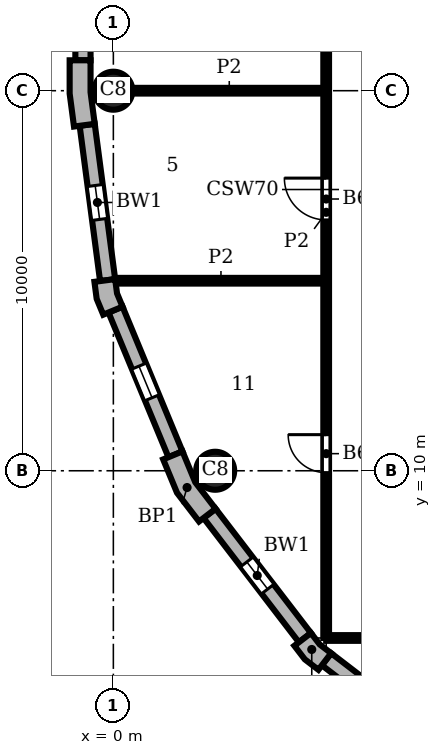
"""IFC4 building model, lengths in metres.
Left out: names, types, materials, properties, quantities, classifications, styles, units other than length and angle.
Written with IfcOpenShell. Run it as: python <this file> out.ifc"""

import sys

from ifc_helpers import new_model, si_unit, direction, frame, frame_2d, origin, origin_2d, place, context, subcontext, project, spatial, polyline, rectangle, circle, outline, extrude, element, fill, save


model = new_model("IFC4")
c1 = context("Model", 3, precision=1e-05, world=origin(), true_north=direction((0.0, 1.0)))
c2 = subcontext(c1, "Body", "Model", "MODEL_VIEW")
j1 = project(units=[si_unit("LENGTHUNIT", "METRE"), si_unit("PLANEANGLEUNIT", "RADIAN")], contexts=[c1])
p1 = place(None, origin())
s1 = spatial("IfcSite", under=j1, at=p1, CompositionType="ELEMENT")
p2 = place(p1, origin())
s2 = spatial("IfcBuilding", under=s1, at=p2, CompositionType="ELEMENT")
p3 = place(p2, frame((0.0, 0.0, 190.2)))
s3 = spatial("IfcBuildingStorey", under=s2, at=p3, CompositionType="ELEMENT", Elevation=190.2)
for number, where, z_axis, x_axis in (
    (1, (0.0, 20.0, 0.0), (0.0, 0.0, 1.0), (1.0, 0.0, 0.0)),
    (2, (2.679, 10.0, 0.0), (0.0, 0.0, 1.0), (1.0, 0.0, 0.0)),
):
    element("IfcColumn", number, at=place(p3, frame(where, z_axis=z_axis, x_axis=x_axis)), inside=s3, PredefinedType="COLUMN", context=c2, shape_type="SweptSolid", body=[
        extrude(circle(Radius=0.5, at=origin_2d()), origin(), (0.0, 0.0, 1.0), 3.9),
    ])
p4 = place(p3, origin())
e3 = element("IfcWall", 3, at=p4, inside=s3, PredefinedType="SOLIDWALL", context=c2, shape_type="SweptSolid", body=[
    extrude(outline(polyline([(-1.0, 20.8), (-1.15, 20.8), (-1.15, 19.925), (-1.036, 19.057), (-0.887, 19.076), (-0.49, 19.128), (-0.6, 19.961), (-0.6, 20.8), (-1.0, 20.8)])), origin(), (0.0, 0.0, 1.0), 3.9),
])
e4 = element("IfcWall", 4, at=p4, inside=s3, PredefinedType="SOLIDWALL", context=c2, shape_type="SweptSolid", body=[
    extrude(outline(polyline([(-0.349, 14.99), (-0.498, 14.971), (-0.439, 14.523), (-0.266, 14.106), (-0.128, 14.164), (0.242, 14.317), (0.097, 14.667), (0.047, 15.043), (-0.349, 14.99)])), origin(), (0.0, 0.0, 1.0), 3.9),
])
e5 = element("IfcWall", 5, at=p4, inside=s3, PredefinedType="SOLIDWALL", context=c2, shape_type="SweptSolid", body=[
    extrude(outline(polyline([(1.449, 10.356), (1.311, 10.299), (1.675, 9.42), (2.254, 8.665), (2.373, 8.757), (2.69, 9.0), (2.155, 9.698), (1.819, 10.51), (1.449, 10.356)])), origin(), (0.0, 0.0, 1.0), 3.9),
])
e6 = element("IfcWall", 6, at=p4, inside=s3, PredefinedType="SOLIDWALL", context=c2, shape_type="SweptSolid", body=[
    extrude(outline(polyline([(4.882, 5.487), (4.763, 5.396), (5.038, 5.038), (5.396, 4.763), (5.487, 4.882), (5.731, 5.199), (5.43, 5.43), (5.199, 5.731), (4.882, 5.487)])), origin(), (0.0, 0.0, 1.0), 3.9),
])
p5 = place(p3, frame((-0.8, 39.2, 0.0), z_axis=(0.0, 0.0, 1.0), x_axis=(0.0, -1.0, 0.0)))
e7 = element("IfcWall", 7, at=p5, inside=s3, PredefinedType="SOLIDWALL", context=c2, shape_type="SweptSolid", body=[
    extrude(rectangle(XDim=18.4, YDim=0.4, at=frame_2d((9.2, 0.0))), origin(), (0.0, 0.0, 1.0), 3.9),
])
p6 = place(p5, frame((3.75, 0.0, 0.9)))
e8 = element("IfcOpeningElement", 8, at=p6, cuts=e7, PredefinedType="OPENING", context=c2, shape_type="SweptSolid", body=[
    extrude(rectangle(XDim=0.9, YDim=2.35, at=frame_2d((0.45, 1.175))), frame((0.0, 0.21, 0.0), z_axis=(0.0, -1.0, 0.0), x_axis=(1.0, 0.0, 0.0)), (0.0, 0.0, 1.0), 0.42),
])
p7 = place(p5, frame((13.75, 0.0, 0.9)))
e9 = element("IfcOpeningElement", 9, at=p7, cuts=e7, PredefinedType="OPENING", context=c2, shape_type="SweptSolid", body=[
    extrude(rectangle(XDim=0.9, YDim=2.35, at=frame_2d((0.45, 1.175))), frame((0.0, 0.21, 0.0), z_axis=(0.0, -1.0, 0.0), x_axis=(1.0, 0.0, 0.0)), (0.0, 0.0, 1.0), 0.42),
])
p8 = place(p3, frame((-0.689, 19.102, 0.0), z_axis=(0.0, 0.0, 1.0), x_axis=(0.130514280502, -0.991446429508, 0.0)))
e10 = element("IfcWall", 10, at=p8, inside=s3, PredefinedType="SOLIDWALL", context=c2, shape_type="SweptSolid", body=[
    extrude(rectangle(XDim=4.121, YDim=0.4, at=frame_2d((2.061, 0.0))), origin(), (0.0, 0.0, 1.0), 3.9),
])
p9 = place(p8, frame((1.611, 0.0, 0.9)))
e11 = element("IfcOpeningElement", 11, at=p9, cuts=e10, PredefinedType="OPENING", context=c2, shape_type="SweptSolid", body=[
    extrude(rectangle(XDim=0.9, YDim=2.35, at=frame_2d((0.45, 1.175))), frame((0.0, 0.21, 0.0), z_axis=(0.0, -1.0, 0.0), x_axis=(1.0, 0.0, 0.0)), (0.0, 0.0, 1.0), 0.42),
])
p10 = place(p3, frame((0.057, 14.24, 0.0), z_axis=(0.0, 0.0, 1.0), x_axis=(0.382721546029, -0.923863744394, 0.0)))
e12 = element("IfcWall", 12, at=p10, inside=s3, PredefinedType="SOLIDWALL", context=c2, shape_type="SweptSolid", body=[
    extrude(rectangle(XDim=4.121, YDim=0.4, at=frame_2d((2.061, 0.0))), origin(), (0.0, 0.0, 1.0), 3.9),
])
p11 = place(p10, frame((1.611, 0.0, 0.9)))
e13 = element("IfcOpeningElement", 13, at=p11, cuts=e12, PredefinedType="OPENING", context=c2, shape_type="SweptSolid", body=[
    extrude(rectangle(XDim=0.9, YDim=2.35, at=frame_2d((0.45, 1.175))), frame((0.0, 0.21, 0.0), z_axis=(0.0, -1.0, 0.0), x_axis=(1.0, 0.0, 0.0)), (0.0, 0.0, 1.0), 0.42),
])
p12 = place(p3, frame((2.532, 8.878, 0.0), z_axis=(0.0, 0.0, 1.0), x_axis=(0.608759824817, -0.793354571229, 0.0)))
e14 = element("IfcWall", 14, at=p12, inside=s3, PredefinedType="SOLIDWALL", context=c2, shape_type="SweptSolid", body=[
    extrude(rectangle(XDim=4.121, YDim=0.4, at=frame_2d((2.061, 0.0))), origin(), (0.0, 0.0, 1.0), 3.9),
])
p13 = place(p12, frame((1.611, 0.0, 0.9)))
e15 = element("IfcOpeningElement", 15, at=p13, cuts=e14, PredefinedType="OPENING", context=c2, shape_type="SweptSolid", body=[
    extrude(rectangle(XDim=0.9, YDim=2.35, at=frame_2d((0.45, 1.175))), frame((0.0, 0.21, 0.0), z_axis=(0.0, -1.0, 0.0), x_axis=(1.0, 0.0, 0.0)), (0.0, 0.0, 1.0), 0.42),
])
p14 = place(p3, frame((5.609, 5.041, 0.0), z_axis=(0.0, 0.0, 1.0), x_axis=(0.793354571229, -0.608759824817, 0.0)))
e16 = element("IfcWall", 16, at=p14, inside=s3, PredefinedType="SOLIDWALL", context=c2, shape_type="SweptSolid", body=[
    extrude(rectangle(XDim=4.121, YDim=0.4, at=frame_2d((2.061, 0.0))), origin(), (0.0, 0.0, 1.0), 3.9),
])
p15 = place(p14, frame((1.611, 0.0, 0.9)))
e17 = element("IfcOpeningElement", 17, at=p15, cuts=e16, PredefinedType="OPENING", context=c2, shape_type="SweptSolid", body=[
    extrude(rectangle(XDim=0.9, YDim=2.35, at=frame_2d((0.45, 1.175))), frame((0.0, 0.21, 0.0), z_axis=(0.0, -1.0, 0.0), x_axis=(1.0, 0.0, 0.0)), (0.0, 0.0, 1.0), 0.42),
])
p16 = place(p3, frame((5.6, 5.6, 0.0), z_axis=(0.0, 0.0, 1.0), x_axis=(0.0, 1.0, 0.0)))
e18 = element("IfcWall", 18, at=p16, inside=s3, PredefinedType="PARTITIONING", context=c2, shape_type="SweptSolid", body=[
    extrude(rectangle(XDim=22.4, YDim=0.15, at=frame_2d((11.2, 0.0))), origin(), (0.0, 0.0, 1.0), 3.58),
])
p17 = place(p16, frame((4.35, 0.0, 0.0)))
e19 = element("IfcOpeningElement", 19, at=p17, cuts=e18, PredefinedType="OPENING", context=c2, shape_type="SweptSolid", body=[
    extrude(rectangle(XDim=1.0, YDim=2.1, at=frame_2d((0.5, 1.05))), frame((0.0, 0.085, 0.0), z_axis=(0.0, -1.0, 0.0), x_axis=(1.0, 0.0, 0.0)), (0.0, 0.0, 1.0), 0.17),
])
p18 = place(p16, frame((11.0, 0.0, 0.0)))
e20 = element("IfcOpeningElement", 20, at=p18, cuts=e18, PredefinedType="OPENING", context=c2, shape_type="SweptSolid", body=[
    extrude(rectangle(XDim=1.1, YDim=2.1, at=frame_2d((0.55, 1.05))), frame((0.0, 0.085, 0.0), z_axis=(0.0, -1.0, 0.0), x_axis=(1.0, 0.0, 0.0)), (0.0, 0.0, 1.0), 0.17),
])
p19 = place(p3, frame((5.6, 5.6, 0.0), z_axis=(0.0, 0.0, 1.0), x_axis=(1.0, 0.0, 0.0)))
e21 = element("IfcWall", 21, at=p19, inside=s3, PredefinedType="PARTITIONING", context=c2, shape_type="SweptSolid", body=[
    extrude(rectangle(XDim=25.4, YDim=0.15, at=frame_2d((12.7, 0.0))), origin(), (0.0, 0.0, 1.0), 3.58),
])
p20 = place(p19, frame((5.1, 0.0, 0.0)))
e22 = element("IfcOpeningElement", 22, at=p20, cuts=e21, PredefinedType="OPENING", context=c2, shape_type="SweptSolid", body=[
    extrude(rectangle(XDim=0.8, YDim=2.1, at=frame_2d((0.4, 1.05))), frame((0.0, 0.085, 0.0), z_axis=(0.0, -1.0, 0.0), x_axis=(1.0, 0.0, 0.0)), (0.0, 0.0, 1.0), 0.17),
])
p21 = place(p19, frame((11.5, 0.0, 0.0)))
e23 = element("IfcOpeningElement", 23, at=p21, cuts=e21, PredefinedType="OPENING", context=c2, shape_type="SweptSolid", body=[
    extrude(rectangle(XDim=1.1, YDim=2.1, at=frame_2d((0.55, 1.05))), frame((0.0, 0.085, 0.0), z_axis=(0.0, -1.0, 0.0), x_axis=(1.0, 0.0, 0.0)), (0.0, 0.0, 1.0), 0.17),
])
p22 = place(p19, frame((19.25, 0.0, 0.0)))
e24 = element("IfcOpeningElement", 24, at=p22, cuts=e21, PredefinedType="OPENING", context=c2, shape_type="SweptSolid", body=[
    extrude(rectangle(XDim=1.0, YDim=2.1, at=frame_2d((0.5, 1.05))), frame((0.0, 0.085, 0.0), z_axis=(0.0, -1.0, 0.0), x_axis=(1.0, 0.0, 0.0)), (0.0, 0.0, 1.0), 0.17),
])
p23 = place(p3, frame((0.063, 15.0, 0.0), z_axis=(0.0, 0.0, 1.0), x_axis=(1.0, 0.0, 0.0)))
e25 = element("IfcWall", 25, at=p23, inside=s3, PredefinedType="PARTITIONING", context=c2, shape_type="SweptSolid", body=[
    extrude(rectangle(XDim=5.537, YDim=0.15, at=frame_2d((2.769, 0.0))), origin(), (0.0, 0.0, 1.0), 3.58),
])
p24 = place(p3, frame((0.5, 20.0, 0.0), z_axis=(0.0, 0.0, 1.0), x_axis=(1.0, 0.0, 0.0)))
e26 = element("IfcWall", 26, at=p24, inside=s3, PredefinedType="PARTITIONING", context=c2, shape_type="SweptSolid", body=[
    extrude(rectangle(XDim=5.1, YDim=0.15, at=frame_2d((2.55, 0.0))), origin(), (0.0, 0.0, 1.0), 3.58),
])
p25 = place(p9, origin())
e27 = element("IfcWindow", 27, at=p25, inside=s3, PartitioningType="SINGLE_PANEL", PredefinedType="WINDOW", context=c2, shape_type="SweptSolid", body=[
    extrude(rectangle(XDim=0.9, YDim=2.35, at=frame_2d((0.45, 1.175))), frame((0.0, 0.16, 0.0), z_axis=(0.0, -1.0, 0.0), x_axis=(1.0, 0.0, 0.0)), (0.0, 0.0, 1.0), 0.06),
])
fill(e11, e27)
p26 = place(p11, origin())
e28 = element("IfcWindow", 28, at=p26, inside=s3, PartitioningType="SINGLE_PANEL", PredefinedType="WINDOW", context=c2, shape_type="SweptSolid", body=[
    extrude(rectangle(XDim=0.9, YDim=2.35, at=frame_2d((0.45, 1.175))), frame((0.0, 0.16, 0.0), z_axis=(0.0, -1.0, 0.0), x_axis=(1.0, 0.0, 0.0)), (0.0, 0.0, 1.0), 0.06),
])
fill(e13, e28)
p27 = place(p13, origin())
e29 = element("IfcWindow", 29, at=p27, inside=s3, PartitioningType="SINGLE_PANEL", PredefinedType="WINDOW", context=c2, shape_type="SweptSolid", body=[
    extrude(rectangle(XDim=0.9, YDim=2.35, at=frame_2d((0.45, 1.175))), frame((0.0, 0.16, 0.0), z_axis=(0.0, -1.0, 0.0), x_axis=(1.0, 0.0, 0.0)), (0.0, 0.0, 1.0), 0.06),
])
fill(e15, e29)
p28 = place(p17, origin())
e30 = element("IfcDoor", 30, at=p28, inside=s3, OperationType="SINGLE_SWING_RIGHT", PredefinedType="DOOR", context=c2, shape_type="SweptSolid", body=[
    extrude(rectangle(XDim=1.0, YDim=2.1, at=frame_2d((0.5, 1.05))), frame((0.0, 0.025, 0.0), z_axis=(0.0, -1.0, 0.0), x_axis=(1.0, 0.0, 0.0)), (0.0, 0.0, 1.0), 0.05),
])
fill(e19, e30)
p29 = place(p18, origin())
e31 = element("IfcDoor", 31, at=p29, inside=s3, OperationType="SINGLE_SWING_RIGHT", PredefinedType="DOOR", context=c2, shape_type="SweptSolid", body=[
    extrude(rectangle(XDim=1.1, YDim=2.1, at=frame_2d((0.55, 1.05))), frame((0.0, 0.025, 0.0), z_axis=(0.0, -1.0, 0.0), x_axis=(1.0, 0.0, 0.0)), (0.0, 0.0, 1.0), 0.05),
])
fill(e20, e31)
save(model, sys.argv[1])
